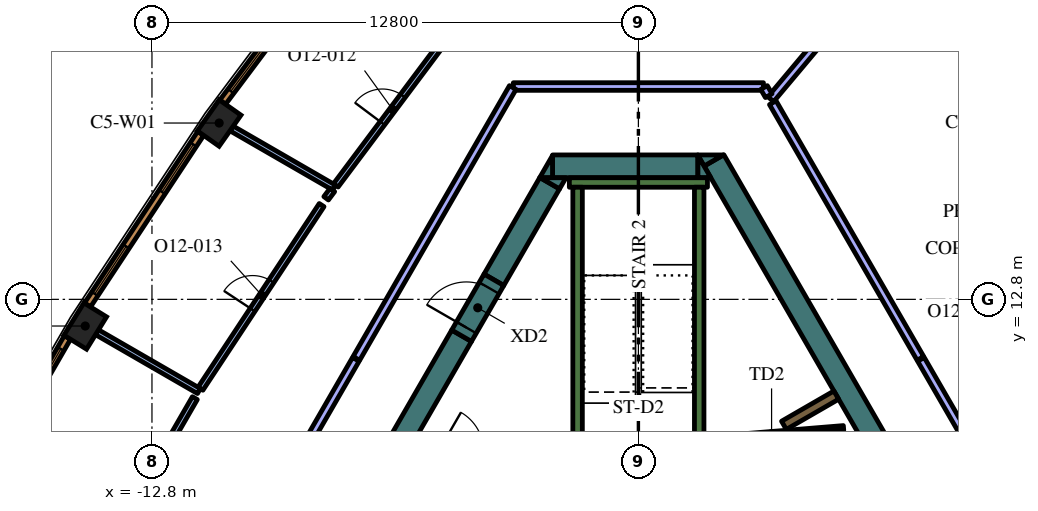
"""IFC4 building model, lengths in metres.
Left out: names, types, materials, properties, quantities, classifications, styles, units other than length and angle.
Written with IfcOpenShell. Run it as: python <this file> out.ifc"""

import sys

from ifc_helpers import new_model, si_unit, direction, frame, frame_2d, origin, origin_2d, place, context, subcontext, project, spatial, polyline, rectangle, outline, extrude, element, fill, save


model = new_model("IFC4")
c1 = context("Model", 3, precision=1e-05, world=origin(), true_north=direction((0.0, 1.0)))
c2 = subcontext(c1, "Body", "Model", "MODEL_VIEW")
j1 = project(units=[si_unit("LENGTHUNIT", "METRE"), si_unit("PLANEANGLEUNIT", "RADIAN")], contexts=[c1])
p1 = place(None, origin())
s1 = spatial("IfcSite", under=j1, at=p1, CompositionType="ELEMENT")
p2 = place(p1, origin())
s2 = spatial("IfcBuilding", under=s1, at=p2, CompositionType="ELEMENT")
p3 = place(p2, frame((0.0, 0.0, 288.0)))
s3 = spatial("IfcBuildingStorey", under=s2, at=p3, CompositionType="ELEMENT", Elevation=288.0)
for number, where, z_axis, x_axis in (
    (1, (-11.032, 17.44, 0.0), (0.0, 0.0, 1.0), (-0.575, -0.818, 0.0)),
    (2, (-14.556, 12.098, 0.0), (0.0, 0.0, 1.0), (-0.526, -0.851, 0.0)),
):
    element("IfcColumn", number, at=place(p3, frame(where, z_axis=z_axis, x_axis=x_axis)), inside=s3, PredefinedType="COLUMN", context=c2, shape_type="SweptSolid", body=[
        extrude(rectangle(XDim=1.0, YDim=0.7, at=origin_2d()), origin(), (0.0, 0.0, 1.0), 4.2),
    ])
p4 = place(p3, frame((1.989, 16.456, 0.0), z_axis=(0.0, 0.0, 1.0), x_axis=(0.49999102663, -0.8660305845, 0.0)))
e3 = element("IfcWall", 3, at=p4, inside=s3, PredefinedType="SOLIDWALL", context=c2, shape_type="SweptSolid", body=[
    extrude(rectangle(XDim=12.406, YDim=0.6, at=frame_2d((6.203, 0.0))), origin(), (0.0, 0.0, 1.0), 4.2),
])
p5 = place(p3, origin())
e4 = element("IfcWall", 4, at=p5, inside=s3, PredefinedType="SOLIDWALL", context=c2, shape_type="SweptSolid", body=[
    extrude(outline(polyline([(1.559, 16.6), (2.235, 16.6), (1.728, 16.307), (1.559, 16.6)])), origin(), (0.0, 0.0, 1.0), 4.2),
])
p6 = place(p3, frame((-2.258, 16.3, 0.0), z_axis=(0.0, 0.0, 1.0), x_axis=(1.0, 0.0, 0.0)))
e5 = element("IfcWall", 5, at=p6, inside=s3, PredefinedType="SOLIDWALL", context=c2, shape_type="SweptSolid", body=[
    extrude(rectangle(XDim=3.823, YDim=0.6, at=frame_2d((1.912, 0.0))), origin(), (0.0, 0.0, 1.0), 4.2),
])
e6 = element("IfcWall", 6, at=p5, inside=s3, PredefinedType="SOLIDWALL", context=c2, shape_type="SweptSolid", body=[
    extrude(outline(polyline([(1.905, 16.0), (1.567, 16.0), (1.567, 16.585), (1.905, 16.0)])), origin(), (0.0, 0.0, 1.0), 4.2),
])
e7 = element("IfcWall", 7, at=p5, inside=s3, PredefinedType="SOLIDWALL", context=c2, shape_type="SweptSolid", body=[
    extrude(outline(polyline([(-2.598, 16.0), (-2.26, 16.585), (-2.26, 16.0), (-2.598, 16.0)])), origin(), (0.0, 0.0, 1.0), 4.2),
])
p7 = place(p3, frame((-2.335, 15.855, 0.0), z_axis=(0.0, 0.0, 1.0), x_axis=(-0.499960127962, -0.866048422692, 0.0)))
e8 = element("IfcWall", 8, at=p7, inside=s3, PredefinedType="SOLIDWALL", context=c2, shape_type="SweptSolid", body=[
    extrude(rectangle(XDim=2.934, YDim=0.6, at=frame_2d((1.467, 0.0))), origin(), (0.0, 0.0, 1.0), 4.2),
])
e9 = element("IfcWall", 9, at=p5, inside=s3, PredefinedType="SOLIDWALL", context=c2, shape_type="SweptSolid", body=[
    extrude(outline(polyline([(-1.905, 16.0), (-2.074, 15.707), (-2.581, 16.0), (-1.905, 16.0)])), origin(), (0.0, 0.0, 1.0), 4.2),
])
e10 = element("IfcWall", 10, at=p5, inside=s3, PredefinedType="SOLIDWALL", context=c2, shape_type="SweptSolid", body=[
    extrude(outline(polyline([(-15.502, -6.35), (-4.912, 11.992), (-4.393, 11.692), (-10.815, 0.569), (-10.84, 0.583), (-10.84, 0.583), (-10.84, 0.583), (-10.965, 0.367), (-10.965, 0.367), (-10.965, 0.367), (-10.94, 0.352), (-11.033, 0.191), (-14.809, -6.35), (-15.156, -6.95), (-15.502, -6.35)])), origin(), (0.0, 0.0, 1.0), 4.2),
])
p8 = place(p3, frame((-1.817, 15.875, 0.0), z_axis=(0.0, 0.0, 1.0), x_axis=(1.0, 0.0, 0.0)))
e11 = element("IfcWall", 11, at=p8, inside=s3, PredefinedType="SOLIDWALL", context=c2, shape_type="SweptSolid", body=[
    extrude(rectangle(XDim=3.634, YDim=0.25, at=frame_2d((1.817, 0.0))), origin(), (0.0, 0.0, 1.0), 4.2),
])
p9 = place(p3, frame((1.6, 8.95, 0.0), z_axis=(0.0, 0.0, 1.0), x_axis=(0.0, 1.0, 0.0)))
e12 = element("IfcWall", 12, at=p9, inside=s3, PredefinedType="SOLIDWALL", context=c2, shape_type="SweptSolid", body=[
    extrude(rectangle(XDim=6.8, YDim=0.25, at=frame_2d((3.4, 0.0))), origin(), (0.0, 0.0, 1.0), 4.2),
])
p10 = place(p3, frame((-1.6, 8.7, 0.0), z_axis=(0.0, 0.0, 1.0), x_axis=(0.0, 1.0, 0.0)))
e13 = element("IfcWall", 13, at=p10, inside=s3, PredefinedType="SOLIDWALL", context=c2, shape_type="SweptSolid", body=[
    extrude(rectangle(XDim=7.05, YDim=0.25, at=frame_2d((3.525, 0.0))), origin(), (0.0, 0.0, 1.0), 4.2),
])
p11 = place(p3, frame((3.83, 9.486, 0.0), z_axis=(0.0, 0.0, 1.0), x_axis=(0.865986202621, 0.500067892261, 0.0)))
e14 = element("IfcWall", 14, at=p11, inside=s3, PredefinedType="SOLIDWALL", context=c2, shape_type="SweptSolid", body=[
    extrude(rectangle(XDim=1.591, YDim=0.25, at=frame_2d((0.795, 0.0))), origin(), (0.0, 0.0, 1.0), 4.2),
])
p12 = place(p3, frame((5.398, 9.419, 0.0), z_axis=(0.0, 0.0, 1.0), x_axis=(-0.996653416376, -0.081743303248, 0.0)))
e15 = element("IfcWall", 15, at=p12, inside=s3, PredefinedType="PARTITIONING", context=c2, shape_type="SweptSolid", body=[
    extrude(rectangle(XDim=2.7, YDim=0.12, at=frame_2d((1.35, 0.0))), origin(), (0.0, 0.0, 1.0), 3.55),
])
p13 = place(p12, frame((1.45, 0.0, 0.0)))
e16 = element("IfcOpeningElement", 16, at=p13, cuts=e15, PredefinedType="OPENING", context=c2, shape_type="SweptSolid", body=[
    extrude(rectangle(XDim=0.9, YDim=2.1, at=frame_2d((0.45, 1.05))), frame((0.0, 0.07, 0.0), z_axis=(0.0, -1.0, 0.0), x_axis=(1.0, 0.0, 0.0)), (0.0, 0.0, 1.0), 0.14),
])
p14 = place(p3, frame((-4.652, 11.842, 0.0), z_axis=(0.0, 0.0, 1.0), x_axis=(0.500062241894, 0.865989465428, 0.0)))
e17 = element("IfcWall", 17, at=p14, inside=s3, PredefinedType="SOLIDWALL", context=c2, shape_type="SweptSolid", body=[
    extrude(rectangle(XDim=1.7, YDim=0.6, at=frame_2d((0.85, 0.0))), origin(), (0.0, 0.0, 1.0), 4.2),
])
p15 = place(p14, frame((0.25, 0.0, 0.0)))
e18 = element("IfcOpeningElement", 18, at=p15, cuts=e17, PredefinedType="OPENING", context=c2, shape_type="SweptSolid", body=[
    extrude(rectangle(XDim=1.2, YDim=2.1, at=frame_2d((0.6, 1.05))), frame((0.0, 0.31, 0.0), z_axis=(0.0, -1.0, 0.0), x_axis=(1.0, 0.0, 0.0)), (0.0, 0.0, 1.0), 0.62),
])
p16 = place(p3, frame((3.483, 18.067, 0.0), z_axis=(0.0, 0.0, 1.0), x_axis=(0.642896944312, 0.765952687177, 0.0)))
e19 = element("IfcWall", 19, at=p16, inside=s3, PredefinedType="PARTITIONING", context=c2, shape_type="SweptSolid", body=[
    extrude(rectangle(XDim=2.29, YDim=0.2, at=frame_2d((1.145, 0.0))), origin(), (0.0, 0.0, 1.0), 3.55),
])
p17 = place(p3, frame((8.792, 8.873, 0.0), z_axis=(0.0, 0.0, 1.0), x_axis=(-0.499992600721, 0.866029675718, 0.0)))
e20 = element("IfcWall", 20, at=p17, inside=s3, PredefinedType="PARTITIONING", context=c2, shape_type="SweptSolid", body=[
    extrude(rectangle(XDim=2.712, YDim=0.2, at=frame_2d((1.356, 0.0))), origin(), (0.0, 0.0, 1.0), 3.55),
])
p18 = place(p3, frame((7.421, 11.247, 0.0), z_axis=(0.0, 0.0, 1.0), x_axis=(-0.499999024953, 0.866025966727, 0.0)))
e21 = element("IfcWall", 21, at=p18, inside=s3, PredefinedType="PARTITIONING", context=c2, shape_type="SweptSolid", body=[
    extrude(rectangle(XDim=7.769, YDim=0.2, at=frame_2d((3.884, 0.0))), origin(), (0.0, 0.0, 1.0), 3.55),
])
p19 = place(p3, frame((-8.007, 15.74, 0.0), z_axis=(0.0, 0.0, 1.0), x_axis=(-0.866044607523, 0.499966736674, 0.0)))
e22 = element("IfcWall", 22, at=p19, inside=s3, PredefinedType="PARTITIONING", context=c2, shape_type="SweptSolid", body=[
    extrude(rectangle(XDim=3.115, YDim=0.15, at=frame_2d((1.557, 0.0))), origin(), (0.0, 0.0, 1.0), 3.55),
])
p20 = place(p3, frame((-7.962, 15.8, 0.0), z_axis=(0.0, 0.0, 1.0), x_axis=(0.599541489613, 0.800343677574, 0.0)))
e23 = element("IfcWall", 23, at=p20, inside=s3, PredefinedType="PARTITIONING", context=c2, shape_type="SweptSolid", body=[
    extrude(rectangle(XDim=4.942, YDim=0.15, at=frame_2d((2.471, 0.0))), origin(), (0.0, 0.0, 1.0), 3.55),
])
p21 = place(p20, frame((2.042, 0.0, 0.0)))
e24 = element("IfcOpeningElement", 24, at=p21, cuts=e23, PredefinedType="OPENING", context=c2, shape_type="SweptSolid", body=[
    extrude(rectangle(XDim=0.9, YDim=2.1, at=frame_2d((0.45, 1.05))), frame((0.0, 0.085, 0.0), z_axis=(0.0, -1.0, 0.0), x_axis=(1.0, 0.0, 0.0)), (0.0, 0.0, 1.0), 0.17),
])
p22 = place(p3, frame((-11.564, 10.387, 0.0), z_axis=(0.0, 0.0, 1.0), x_axis=(-0.86604641216, 0.499963610661, 0.0)))
e25 = element("IfcWall", 25, at=p22, inside=s3, PredefinedType="PARTITIONING", context=c2, shape_type="SweptSolid", body=[
    extrude(rectangle(XDim=3.096, YDim=0.15, at=frame_2d((1.548, 0.0))), origin(), (0.0, 0.0, 1.0), 3.55),
])
p23 = place(p3, frame((-8.052, 15.679, 0.0), z_axis=(0.0, 0.0, 1.0), x_axis=(-0.599004157744, -0.800745914136, 0.0)))
e26 = element("IfcWall", 26, at=p23, inside=s3, PredefinedType="PARTITIONING", context=c2, shape_type="SweptSolid", body=[
    extrude(rectangle(XDim=0.275, YDim=0.15, at=frame_2d((0.137, 0.0))), origin(), (0.0, 0.0, 1.0), 3.55),
])
p24 = place(p3, frame((-11.523, 10.449, 0.0), z_axis=(0.0, 0.0, 1.0), x_axis=(0.550751709023, 0.834669129061, 0.0)))
e27 = element("IfcWall", 27, at=p24, inside=s3, PredefinedType="PARTITIONING", context=c2, shape_type="SweptSolid", body=[
    extrude(rectangle(XDim=5.788, YDim=0.15, at=frame_2d((2.894, 0.0))), origin(), (0.0, 0.0, 1.0), 3.55),
])
p25 = place(p24, frame((2.488, 0.0, 0.0)))
e28 = element("IfcOpeningElement", 28, at=p25, cuts=e27, PredefinedType="OPENING", context=c2, shape_type="SweptSolid", body=[
    extrude(rectangle(XDim=0.9, YDim=2.1, at=frame_2d((0.45, 1.05))), frame((0.0, 0.085, 0.0), z_axis=(0.0, -1.0, 0.0), x_axis=(1.0, 0.0, 0.0)), (0.0, 0.0, 1.0), 0.17),
])
p26 = place(p3, frame((-14.74, 4.887, 0.0), z_axis=(0.0, 0.0, 1.0), x_axis=(0.500007141444, 0.86602128063, 0.0)))
e29 = element("IfcWall", 29, at=p26, inside=s3, PredefinedType="PARTITIONING", context=c2, shape_type="SweptSolid", body=[
    extrude(rectangle(XDim=6.137, YDim=0.15, at=frame_2d((3.068, 0.0))), origin(), (0.0, 0.0, 1.0), 3.55),
])
p27 = place(p26, frame((2.637, 0.0, 0.0)))
e30 = element("IfcOpeningElement", 30, at=p27, cuts=e29, PredefinedType="OPENING", context=c2, shape_type="SweptSolid", body=[
    extrude(rectangle(XDim=0.9, YDim=2.1, at=frame_2d((0.45, 1.05))), frame((0.0, 0.085, 0.0), z_axis=(0.0, -1.0, 0.0), x_axis=(1.0, 0.0, 0.0)), (0.0, 0.0, 1.0), 0.17),
])
p28 = place(p3, frame((-7.436, 11.221, 0.0), z_axis=(0.0, 0.0, 1.0), x_axis=(-0.49999894854, -0.866026010844, 0.0)))
e31 = element("IfcWall", 31, at=p28, inside=s3, PredefinedType="PARTITIONING", context=c2, shape_type="SweptSolid", body=[
    extrude(rectangle(XDim=12.0, YDim=0.2, at=frame_2d((6.0, 0.0))), origin(), (0.0, 0.0, 1.0), 3.55),
])
p29 = place(p28, frame((5.5, 0.0, 0.0)))
e32 = element("IfcOpeningElement", 32, at=p29, cuts=e31, PredefinedType="OPENING", context=c2, shape_type="SweptSolid", body=[
    extrude(rectangle(XDim=1.0, YDim=2.1, at=frame_2d((0.5, 1.05))), frame((0.0, 0.11, 0.0), z_axis=(0.0, -1.0, 0.0), x_axis=(1.0, 0.0, 0.0)), (0.0, 0.0, 1.0), 0.22),
])
p30 = place(p3, frame((3.291, 18.4, 0.0), z_axis=(0.0, 0.0, 1.0), x_axis=(-1.0, 0.0, 0.0)))
e33 = element("IfcWall", 33, at=p30, inside=s3, PredefinedType="PARTITIONING", context=c2, shape_type="SweptSolid", body=[
    extrude(rectangle(XDim=6.582, YDim=0.2, at=frame_2d((3.291, 0.0))), origin(), (0.0, 0.0, 1.0), 3.55),
])
p31 = place(p3, frame((-3.306, 18.374, 0.0), z_axis=(0.0, 0.0, 1.0), x_axis=(-0.499999798456, -0.866025520146, 0.0)))
e34 = element("IfcWall", 34, at=p31, inside=s3, PredefinedType="PARTITIONING", context=c2, shape_type="SweptSolid", body=[
    extrude(rectangle(XDim=8.229, YDim=0.2, at=frame_2d((4.115, 0.0))), origin(), (0.0, 0.0, 1.0), 3.55),
])
p32 = place(p3, frame((3.43, 18.159, 0.0), z_axis=(0.0, 0.0, 1.0), x_axis=(-0.499949632511, 0.866054481515, 0.0)))
e35 = element("IfcWall", 35, at=p32, inside=s3, PredefinedType="PARTITIONING", context=c2, shape_type="SweptSolid", body=[
    extrude(rectangle(XDim=0.248, YDim=0.2, at=frame_2d((0.124, 0.0))), origin(), (0.0, 0.0, 1.0), 3.55),
])
p33 = place(p3, frame((10.938, 17.99, 0.0), z_axis=(0.0, 0.0, 1.0), x_axis=(-0.599559865294, 0.800329911929, 0.0)))
e36 = element("IfcWall", 36, at=p33, inside=s3, PredefinedType="SOLIDWALL", context=c2, shape_type="SweptSolid", body=[
    extrude(rectangle(XDim=5.415, YDim=0.19, at=frame_2d((2.708, 0.0))), origin(), (0.0, 0.0, 1.0), 3.95),
])
p34 = place(p33, frame((0.358, 0.0, 0.6)))
e37 = element("IfcOpeningElement", 37, at=p34, cuts=e36, PredefinedType="OPENING", context=c2, shape_type="SweptSolid", body=[
    extrude(rectangle(XDim=1.5, YDim=2.85, at=frame_2d((0.75, 1.425))), frame((0.0, 0.105, 0.0), z_axis=(0.0, -1.0, 0.0), x_axis=(1.0, 0.0, 0.0)), (0.0, 0.0, 1.0), 0.21),
])
p35 = place(p33, frame((3.593, 0.0, 0.6)))
e38 = element("IfcOpeningElement", 38, at=p35, cuts=e36, PredefinedType="OPENING", context=c2, shape_type="SweptSolid", body=[
    extrude(rectangle(XDim=1.5, YDim=2.85, at=frame_2d((0.75, 1.425))), frame((0.0, 0.105, 0.0), z_axis=(0.0, -1.0, 0.0), x_axis=(1.0, 0.0, 0.0)), (0.0, 0.0, 1.0), 0.21),
])
p36 = place(p3, frame((-7.692, 22.324, 0.0), z_axis=(0.0, 0.0, 1.0), x_axis=(-0.599559865294, -0.800329911929, 0.0)))
e39 = element("IfcWall", 39, at=p36, inside=s3, PredefinedType="SOLIDWALL", context=c2, shape_type="SweptSolid", body=[
    extrude(rectangle(XDim=5.415, YDim=0.19, at=frame_2d((2.708, 0.0))), origin(), (0.0, 0.0, 1.0), 3.95),
])
p37 = place(p36, frame((0.323, 0.0, 0.6)))
e40 = element("IfcOpeningElement", 40, at=p37, cuts=e39, PredefinedType="OPENING", context=c2, shape_type="SweptSolid", body=[
    extrude(rectangle(XDim=1.5, YDim=2.85, at=frame_2d((0.75, 1.425))), frame((0.0, 0.105, 0.0), z_axis=(0.0, -1.0, 0.0), x_axis=(1.0, 0.0, 0.0)), (0.0, 0.0, 1.0), 0.21),
])
p38 = place(p36, frame((3.558, 0.0, 0.6)))
e41 = element("IfcOpeningElement", 41, at=p38, cuts=e39, PredefinedType="OPENING", context=c2, shape_type="SweptSolid", body=[
    extrude(rectangle(XDim=1.5, YDim=2.85, at=frame_2d((0.75, 1.425))), frame((0.0, 0.105, 0.0), z_axis=(0.0, -1.0, 0.0), x_axis=(1.0, 0.0, 0.0)), (0.0, 0.0, 1.0), 0.21),
])
p39 = place(p3, frame((-11.518, 17.166, 0.0), z_axis=(0.0, 0.0, 1.0), x_axis=(-0.550744054781, -0.83467417962, 0.0)))
e42 = element("IfcWall", 42, at=p39, inside=s3, PredefinedType="SOLIDWALL", context=c2, shape_type="SweptSolid", body=[
    extrude(rectangle(XDim=5.406, YDim=0.19, at=frame_2d((2.703, 0.0))), origin(), (0.0, 0.0, 1.0), 3.95),
])
p40 = place(p39, frame((0.346, 0.0, 0.6)))
e43 = element("IfcOpeningElement", 43, at=p40, cuts=e42, PredefinedType="OPENING", context=c2, shape_type="SweptSolid", body=[
    extrude(rectangle(XDim=1.5, YDim=2.85, at=frame_2d((0.75, 1.425))), frame((0.0, 0.105, 0.0), z_axis=(0.0, -1.0, 0.0), x_axis=(1.0, 0.0, 0.0)), (0.0, 0.0, 1.0), 0.21),
])
p41 = place(p39, frame((3.559, 0.0, 0.6)))
e44 = element("IfcOpeningElement", 44, at=p41, cuts=e42, PredefinedType="OPENING", context=c2, shape_type="SweptSolid", body=[
    extrude(rectangle(XDim=1.5, YDim=2.85, at=frame_2d((0.75, 1.425))), frame((0.0, 0.105, 0.0), z_axis=(0.0, -1.0, 0.0), x_axis=(1.0, 0.0, 0.0)), (0.0, 0.0, 1.0), 0.21),
])
p42 = place(p3, frame((-15.025, 11.796, 0.0), z_axis=(0.0, 0.0, 1.0), x_axis=(-0.500024767483, -0.866011103799, 0.0)))
e45 = element("IfcWall", 45, at=p42, inside=s3, PredefinedType="SOLIDWALL", context=c2, shape_type="SweptSolid", body=[
    extrude(rectangle(XDim=5.406, YDim=0.19, at=frame_2d((2.703, 0.0))), origin(), (0.0, 0.0, 1.0), 3.95),
])
p43 = place(p42, frame((0.346, 0.0, 0.6)))
e46 = element("IfcOpeningElement", 46, at=p43, cuts=e45, PredefinedType="OPENING", context=c2, shape_type="SweptSolid", body=[
    extrude(rectangle(XDim=1.5, YDim=2.85, at=frame_2d((0.75, 1.425))), frame((0.0, 0.105, 0.0), z_axis=(0.0, -1.0, 0.0), x_axis=(1.0, 0.0, 0.0)), (0.0, 0.0, 1.0), 0.21),
])
p44 = place(p42, frame((3.559, 0.0, 0.6)))
e47 = element("IfcOpeningElement", 47, at=p44, cuts=e45, PredefinedType="OPENING", context=c2, shape_type="SweptSolid", body=[
    extrude(rectangle(XDim=1.5, YDim=2.85, at=frame_2d((0.75, 1.425))), frame((0.0, 0.105, 0.0), z_axis=(0.0, -1.0, 0.0), x_axis=(1.0, 0.0, 0.0)), (0.0, 0.0, 1.0), 0.21),
])
p45 = place(p13, origin())
e48 = element("IfcDoor", 48, at=p45, inside=s3, OperationType="SINGLE_SWING_LEFT", PredefinedType="DOOR", context=c2, shape_type="SweptSolid", body=[
    extrude(rectangle(XDim=0.9, YDim=2.1, at=frame_2d((0.45, 1.05))), frame((0.0, 0.025, 0.0), z_axis=(0.0, -1.0, 0.0), x_axis=(1.0, 0.0, 0.0)), (0.0, 0.0, 1.0), 0.05),
])
fill(e16, e48)
p46 = place(p15, origin())
e49 = element("IfcDoor", 49, at=p46, inside=s3, OperationType="SINGLE_SWING_LEFT", PredefinedType="DOOR", context=c2, shape_type="SweptSolid", body=[
    extrude(rectangle(XDim=1.2, YDim=2.1, at=frame_2d((0.6, 1.05))), frame((0.0, 0.025, 0.0), z_axis=(0.0, -1.0, 0.0), x_axis=(1.0, 0.0, 0.0)), (0.0, 0.0, 1.0), 0.05),
])
fill(e18, e49)
p47 = place(p21, origin())
e50 = element("IfcDoor", 50, at=p47, inside=s3, OperationType="SINGLE_SWING_RIGHT", PredefinedType="DOOR", context=c2, shape_type="SweptSolid", body=[
    extrude(rectangle(XDim=0.9, YDim=2.1, at=frame_2d((0.45, 1.05))), frame((0.0, 0.025, 0.0), z_axis=(0.0, -1.0, 0.0), x_axis=(1.0, 0.0, 0.0)), (0.0, 0.0, 1.0), 0.05),
])
fill(e24, e50)
p48 = place(p25, origin())
e51 = element("IfcDoor", 51, at=p48, inside=s3, OperationType="SINGLE_SWING_RIGHT", PredefinedType="DOOR", context=c2, shape_type="SweptSolid", body=[
    extrude(rectangle(XDim=0.9, YDim=2.1, at=frame_2d((0.45, 1.05))), frame((0.0, 0.025, 0.0), z_axis=(0.0, -1.0, 0.0), x_axis=(1.0, 0.0, 0.0)), (0.0, 0.0, 1.0), 0.05),
])
fill(e28, e51)
p49 = place(p38, origin())
e52 = element("IfcWindow", 52, at=p49, inside=s3, PartitioningType="SINGLE_PANEL", PredefinedType="WINDOW", context=c2, shape_type="SweptSolid", body=[
    extrude(rectangle(XDim=1.5, YDim=2.85, at=frame_2d((0.75, 1.425))), frame((0.0, 0.045, 0.0), z_axis=(0.0, -1.0, 0.0), x_axis=(1.0, 0.0, 0.0)), (0.0, 0.0, 1.0), 0.06),
])
fill(e41, e52)
p50 = place(p40, origin())
e53 = element("IfcWindow", 53, at=p50, inside=s3, PartitioningType="SINGLE_PANEL", PredefinedType="WINDOW", context=c2, shape_type="SweptSolid", body=[
    extrude(rectangle(XDim=1.5, YDim=2.85, at=frame_2d((0.75, 1.425))), frame((0.0, 0.045, 0.0), z_axis=(0.0, -1.0, 0.0), x_axis=(1.0, 0.0, 0.0)), (0.0, 0.0, 1.0), 0.06),
])
fill(e43, e53)
p51 = place(p41, origin())
e54 = element("IfcWindow", 54, at=p51, inside=s3, PartitioningType="SINGLE_PANEL", PredefinedType="WINDOW", context=c2, shape_type="SweptSolid", body=[
    extrude(rectangle(XDim=1.5, YDim=2.85, at=frame_2d((0.75, 1.425))), frame((0.0, 0.045, 0.0), z_axis=(0.0, -1.0, 0.0), x_axis=(1.0, 0.0, 0.0)), (0.0, 0.0, 1.0), 0.06),
])
fill(e44, e54)
p52 = place(p43, origin())
e55 = element("IfcWindow", 55, at=p52, inside=s3, PartitioningType="SINGLE_PANEL", PredefinedType="WINDOW", context=c2, shape_type="SweptSolid", body=[
    extrude(rectangle(XDim=1.5, YDim=2.85, at=frame_2d((0.75, 1.425))), frame((0.0, 0.045, 0.0), z_axis=(0.0, -1.0, 0.0), x_axis=(1.0, 0.0, 0.0)), (0.0, 0.0, 1.0), 0.06),
])
fill(e46, e55)
save(model, sys.argv[1])
